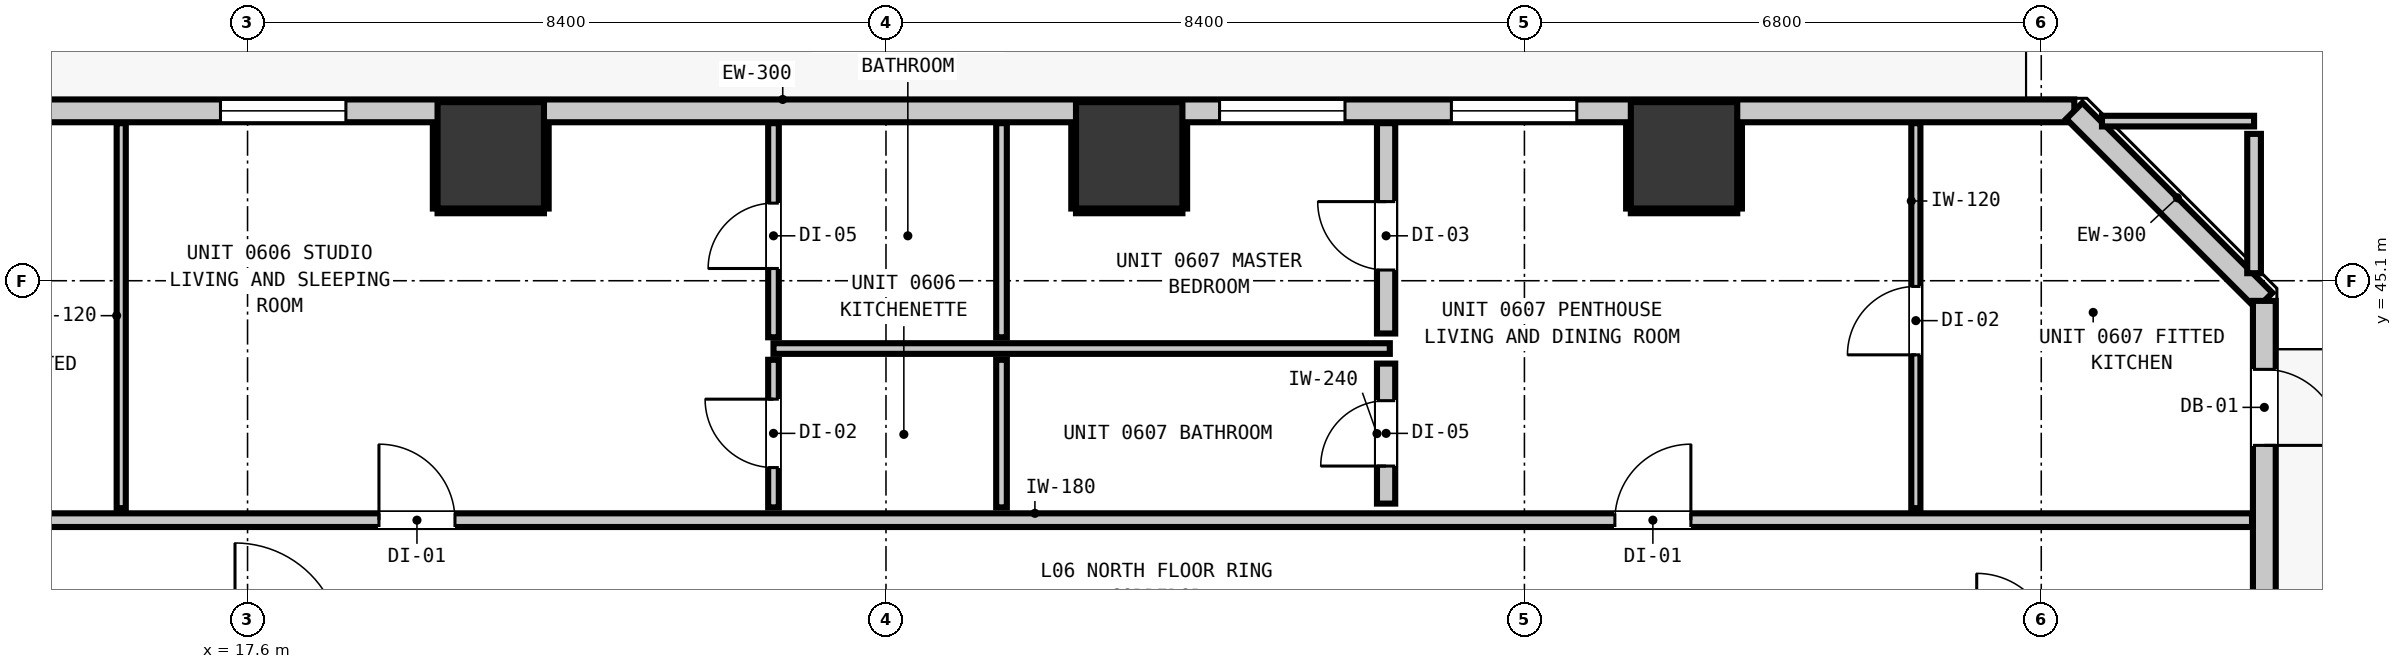
"""IFC4 building model, lengths in metres.
Left out: names, types, materials, properties, quantities, classifications, styles, units other than length and angle.
Written with IfcOpenShell. Run it as: python <this file> out.ifc"""

import sys

from ifc_helpers import new_model, si_unit, direction, frame, frame_2d, origin, origin_2d, place, context, subcontext, project, spatial, rectangle, extrude, element, fill, save


model = new_model("IFC4")
c1 = context("Model", 3, precision=1e-05, world=origin(), true_north=direction((0.0, 1.0)))
c2 = subcontext(c1, "Body", "Model", "MODEL_VIEW")
j1 = project(units=[si_unit("LENGTHUNIT", "METRE"), si_unit("PLANEANGLEUNIT", "RADIAN")], contexts=[c1])
p1 = place(None, origin())
s1 = spatial("IfcSite", under=j1, at=p1, CompositionType="ELEMENT")
p2 = place(p1, origin())
s2 = spatial("IfcBuilding", under=s1, at=p2, CompositionType="ELEMENT")
p3 = place(p2, frame((0.0, 0.0, 25.32)))
s3 = spatial("IfcBuildingStorey", under=s2, at=p3, CompositionType="ELEMENT", Elevation=25.32)
for number, where, z_axis, x_axis in (
    (1, (20.8, 46.75, 0.0), (0.0, 0.0, 1.0), (1.0, 0.0, 0.0)),
    (2, (29.2, 46.75, 0.0), (0.0, 0.0, 1.0), (1.0, 0.0, 0.0)),
    (3, (36.5, 46.75, 0.0), (0.0, 0.0, 1.0), (1.0, 0.0, 0.0)),
):
    element("IfcColumn", number, at=place(p3, frame(where, z_axis=z_axis, x_axis=x_axis)), inside=s3, PredefinedType="COLUMN", context=c2, shape_type="SweptSolid", body=[
        extrude(rectangle(XDim=1.4, YDim=1.4, at=origin_2d()), origin(), (0.0, 0.0, 1.0), 3.32),
    ])
p4 = place(p3, frame((4.165, 47.335, 0.0), z_axis=(0.0, 0.0, 1.0), x_axis=(1.0, 0.0, 0.0)))
e4 = element("IfcWall", 4, at=p4, inside=s3, PredefinedType="STANDARD", context=c2, shape_type="SweptSolid", body=[
    extrude(rectangle(XDim=37.47, YDim=0.3, at=frame_2d((18.735, 0.0))), origin(), (0.0, 0.0, 1.0), 3.06),
])
p5 = place(p4, frame((0.901, 0.0, 0.0)))
e5 = element("IfcOpeningElement", 5, at=p5, cuts=e4, PredefinedType="OPENING", context=c2, shape_type="SweptSolid", body=[
    extrude(rectangle(XDim=1.0, YDim=2.15, at=frame_2d((0.5, 1.075))), frame((0.0, 0.16, 0.0), z_axis=(0.0, -1.0, 0.0), x_axis=(1.0, 0.0, 0.0)), (0.0, 0.0, 1.0), 0.32),
])
p6 = place(p4, frame((4.243, 0.0, 0.85)))
e6 = element("IfcOpeningElement", 6, at=p6, cuts=e4, PredefinedType="OPENING", context=c2, shape_type="SweptSolid", body=[
    extrude(rectangle(XDim=1.65, YDim=1.75, at=frame_2d((0.825, 0.875))), frame((0.0, 0.16, 0.0), z_axis=(0.0, -1.0, 0.0), x_axis=(1.0, 0.0, 0.0)), (0.0, 0.0, 1.0), 0.32),
])
p7 = place(p4, frame((13.079, 0.0, 0.85)))
e7 = element("IfcOpeningElement", 7, at=p7, cuts=e4, PredefinedType="OPENING", context=c2, shape_type="SweptSolid", body=[
    extrude(rectangle(XDim=1.65, YDim=1.75, at=frame_2d((0.825, 0.875))), frame((0.0, 0.16, 0.0), z_axis=(0.0, -1.0, 0.0), x_axis=(1.0, 0.0, 0.0)), (0.0, 0.0, 1.0), 0.32),
])
p8 = place(p4, frame((29.274, 0.0, 0.85)))
e8 = element("IfcOpeningElement", 8, at=p8, cuts=e4, PredefinedType="OPENING", context=c2, shape_type="SweptSolid", body=[
    extrude(rectangle(XDim=1.65, YDim=1.75, at=frame_2d((0.825, 0.875))), frame((0.0, 0.16, 0.0), z_axis=(0.0, -1.0, 0.0), x_axis=(1.0, 0.0, 0.0)), (0.0, 0.0, 1.0), 0.32),
])
p9 = place(p4, frame((26.224, 0.0, 0.85)))
e9 = element("IfcOpeningElement", 9, at=p9, cuts=e4, PredefinedType="OPENING", context=c2, shape_type="SweptSolid", body=[
    extrude(rectangle(XDim=1.65, YDim=1.75, at=frame_2d((0.825, 0.875))), frame((0.0, 0.16, 0.0), z_axis=(0.0, -1.0, 0.0), x_axis=(1.0, 0.0, 0.0)), (0.0, 0.0, 1.0), 0.32),
])
p10 = place(p3, frame((41.635, 47.335, 0.0), z_axis=(0.0, 0.0, 1.0), x_axis=(0.707106781187, -0.707106781187, 0.0)))
e10 = element("IfcWall", 10, at=p10, inside=s3, PredefinedType="STANDARD", context=c2, shape_type="SweptSolid", body=[
    extrude(rectangle(XDim=3.536, YDim=0.3, at=frame_2d((1.768, 0.0))), origin(), (0.0, 0.0, 1.0), 3.06),
])
p11 = place(p3, frame((44.135, 44.835, 0.0), z_axis=(0.0, 0.0, 1.0), x_axis=(0.0, -1.0, 0.0)))
e11 = element("IfcWall", 11, at=p11, inside=s3, PredefinedType="STANDARD", context=c2, shape_type="SweptSolid", body=[
    extrude(rectangle(XDim=34.67, YDim=0.3, at=frame_2d((17.335, 0.0))), origin(), (0.0, 0.0, 1.0), 3.06),
])
p12 = place(p11, frame((0.901, 0.0, 0.0)))
e12 = element("IfcOpeningElement", 12, at=p12, cuts=e11, PredefinedType="OPENING", context=c2, shape_type="SweptSolid", body=[
    extrude(rectangle(XDim=1.0, YDim=2.15, at=frame_2d((0.5, 1.075))), frame((0.0, 0.16, 0.0), z_axis=(0.0, -1.0, 0.0), x_axis=(1.0, 0.0, 0.0)), (0.0, 0.0, 1.0), 0.32),
])
p13 = place(p11, frame((19.91, 0.0, 0.85)))
e13 = element("IfcOpeningElement", 13, at=p13, cuts=e11, PredefinedType="OPENING", context=c2, shape_type="SweptSolid", body=[
    extrude(rectangle(XDim=1.65, YDim=1.75, at=frame_2d((0.825, 0.875))), frame((0.0, 0.16, 0.0), z_axis=(0.0, -1.0, 0.0), x_axis=(1.0, 0.0, 0.0)), (0.0, 0.0, 1.0), 0.32),
])
p14 = place(p11, frame((7.126, 0.0, 0.85)))
e14 = element("IfcOpeningElement", 14, at=p14, cuts=e11, PredefinedType="OPENING", context=c2, shape_type="SweptSolid", body=[
    extrude(rectangle(XDim=1.65, YDim=1.75, at=frame_2d((0.825, 0.875))), frame((0.0, 0.16, 0.0), z_axis=(0.0, -1.0, 0.0), x_axis=(1.0, 0.0, 0.0)), (0.0, 0.0, 1.0), 0.32),
])
p15 = place(p3, frame((12.989, 41.95, 0.0), z_axis=(0.0, 0.0, 1.0), x_axis=(1.0, 0.0, 0.0)))
e15 = element("IfcWall", 15, at=p15, inside=s3, PredefinedType="PARTITIONING", context=c2, shape_type="SweptSolid", body=[
    extrude(rectangle(XDim=30.984, YDim=0.18, at=frame_2d((15.492, 0.0))), origin(), (0.0, 0.0, 1.0), 3.06),
])
p16 = place(p15, frame((6.34, 0.0, 0.0)))
e16 = element("IfcOpeningElement", 16, at=p16, cuts=e15, PredefinedType="OPENING", context=c2, shape_type="SweptSolid", body=[
    extrude(rectangle(XDim=1.0, YDim=2.15, at=frame_2d((0.5, 1.075))), frame((0.0, 0.1, 0.0), z_axis=(0.0, -1.0, 0.0), x_axis=(1.0, 0.0, 0.0)), (0.0, 0.0, 1.0), 0.2),
])
p17 = place(p15, frame((22.601, 0.0, 0.0)))
e17 = element("IfcOpeningElement", 17, at=p17, cuts=e15, PredefinedType="OPENING", context=c2, shape_type="SweptSolid", body=[
    extrude(rectangle(XDim=1.0, YDim=2.15, at=frame_2d((0.5, 1.075))), frame((0.0, 0.1, 0.0), z_axis=(0.0, -1.0, 0.0), x_axis=(1.0, 0.0, 0.0)), (0.0, 0.0, 1.0), 0.2),
])
p18 = place(p3, frame((24.52, 44.208, 0.0), z_axis=(0.0, 0.0, 1.0), x_axis=(1.0, 0.0, 0.0)))
e18 = element("IfcWall", 18, at=p18, inside=s3, PredefinedType="PARTITIONING", context=c2, shape_type="SweptSolid", body=[
    extrude(rectangle(XDim=8.109, YDim=0.14, at=frame_2d((4.054, 0.0))), origin(), (0.0, 0.0, 1.0), 3.06),
])
p19 = place(p3, frame((41.999, 47.2, 0.0), z_axis=(0.0, 0.0, 1.0), x_axis=(1.0, 0.0, 0.0)))
e19 = element("IfcWall", 19, at=p19, inside=s3, PredefinedType="PARTITIONING", context=c2, shape_type="SweptSolid", body=[
    extrude(rectangle(XDim=2.001, YDim=0.14, at=frame_2d((1.0, 0.0))), origin(), (0.0, 0.0, 1.0), 3.06),
])
p20 = place(p3, frame((32.58, 42.168, 0.0), z_axis=(0.0, 0.0, 1.0), x_axis=(0.0, 1.0, 0.0)))
e20 = element("IfcWall", 20, at=p20, inside=s3, PredefinedType="PARTITIONING", context=c2, shape_type="SweptSolid", body=[
    extrude(rectangle(XDim=1.842, YDim=0.24, at=frame_2d((0.921, 0.0))), origin(), (0.0, 0.0, 1.0), 3.06),
])
p21 = place(p20, frame((0.494, 0.0, 0.0)))
e21 = element("IfcOpeningElement", 21, at=p21, cuts=e20, PredefinedType="OPENING", context=c2, shape_type="SweptSolid", body=[
    extrude(rectangle(XDim=0.86, YDim=2.02, at=frame_2d((0.43, 1.01))), frame((0.0, 0.13, 0.0), z_axis=(0.0, -1.0, 0.0), x_axis=(1.0, 0.0, 0.0)), (0.0, 0.0, 1.0), 0.26),
])
p22 = place(p3, frame((32.58, 44.406, 0.0), z_axis=(0.0, 0.0, 1.0), x_axis=(0.0, 1.0, 0.0)))
e22 = element("IfcWall", 22, at=p22, inside=s3, PredefinedType="PARTITIONING", context=c2, shape_type="SweptSolid", body=[
    extrude(rectangle(XDim=2.767, YDim=0.24, at=frame_2d((1.384, 0.0))), origin(), (0.0, 0.0, 1.0), 3.06),
])
p23 = place(p22, frame((0.835, 0.0, 0.0)))
e23 = element("IfcOpeningElement", 23, at=p23, cuts=e22, PredefinedType="OPENING", context=c2, shape_type="SweptSolid", body=[
    extrude(rectangle(XDim=0.9, YDim=2.1, at=frame_2d((0.45, 1.05))), frame((0.0, 0.13, 0.0), z_axis=(0.0, -1.0, 0.0), x_axis=(1.0, 0.0, 0.0)), (0.0, 0.0, 1.0), 0.26),
])
p24 = place(p3, frame((44.0, 45.199, 0.0), z_axis=(0.0, 0.0, 1.0), x_axis=(0.0, 1.0, 0.0)))
e24 = element("IfcWall", 24, at=p24, inside=s3, PredefinedType="PARTITIONING", context=c2, shape_type="SweptSolid", body=[
    extrude(rectangle(XDim=1.833, YDim=0.18, at=frame_2d((0.917, 0.0))), origin(), (0.0, 0.0, 1.0), 3.06),
])
p25 = place(p3, frame((24.52, 42.118, 0.0), z_axis=(0.0, 0.0, 1.0), x_axis=(0.0, 1.0, 0.0)))
e25 = element("IfcWall", 25, at=p25, inside=s3, PredefinedType="PARTITIONING", context=c2, shape_type="SweptSolid", body=[
    extrude(rectangle(XDim=1.942, YDim=0.14, at=frame_2d((0.971, 0.0))), origin(), (0.0, 0.0, 1.0), 3.06),
])
p26 = place(p25, frame((0.524, 0.0, 0.0)))
e26 = element("IfcOpeningElement", 26, at=p26, cuts=e25, PredefinedType="OPENING", context=c2, shape_type="SweptSolid", body=[
    extrude(rectangle(XDim=0.9, YDim=2.1, at=frame_2d((0.45, 1.05))), frame((0.0, 0.08, 0.0), z_axis=(0.0, -1.0, 0.0), x_axis=(1.0, 0.0, 0.0)), (0.0, 0.0, 1.0), 0.16),
])
p27 = place(p3, frame((24.52, 44.356, 0.0), z_axis=(0.0, 0.0, 1.0), x_axis=(0.0, 1.0, 0.0)))
e27 = element("IfcWall", 27, at=p27, inside=s3, PredefinedType="PARTITIONING", context=c2, shape_type="SweptSolid", body=[
    extrude(rectangle(XDim=2.817, YDim=0.14, at=frame_2d((1.409, 0.0))), origin(), (0.0, 0.0, 1.0), 3.06),
])
p28 = place(p27, frame((0.905, 0.0, 0.0)))
e28 = element("IfcOpeningElement", 28, at=p28, cuts=e27, PredefinedType="OPENING", context=c2, shape_type="SweptSolid", body=[
    extrude(rectangle(XDim=0.86, YDim=2.02, at=frame_2d((0.43, 1.01))), frame((0.0, 0.08, 0.0), z_axis=(0.0, -1.0, 0.0), x_axis=(1.0, 0.0, 0.0)), (0.0, 0.0, 1.0), 0.16),
])
p29 = place(p3, frame((27.52, 42.118, 0.0), z_axis=(0.0, 0.0, 1.0), x_axis=(0.0, 1.0, 0.0)))
e29 = element("IfcWall", 29, at=p29, inside=s3, PredefinedType="PARTITIONING", context=c2, shape_type="SweptSolid", body=[
    extrude(rectangle(XDim=1.942, YDim=0.14, at=frame_2d((0.971, 0.0))), origin(), (0.0, 0.0, 1.0), 3.06),
])
p30 = place(p3, frame((27.52, 44.356, 0.0), z_axis=(0.0, 0.0, 1.0), x_axis=(0.0, 1.0, 0.0)))
e30 = element("IfcWall", 30, at=p30, inside=s3, PredefinedType="PARTITIONING", context=c2, shape_type="SweptSolid", body=[
    extrude(rectangle(XDim=2.817, YDim=0.14, at=frame_2d((1.409, 0.0))), origin(), (0.0, 0.0, 1.0), 3.06),
])
p31 = place(p3, frame((15.938, 42.108, 0.0), z_axis=(0.0, 0.0, 1.0), x_axis=(0.0, 1.0, 0.0)))
e31 = element("IfcWall", 31, at=p31, inside=s3, PredefinedType="PARTITIONING", context=c2, shape_type="SweptSolid", body=[
    extrude(rectangle(XDim=5.065, YDim=0.12, at=frame_2d((2.533, 0.0))), origin(), (0.0, 0.0, 1.0), 3.06),
])
p32 = place(p3, frame((39.55, 42.108, 0.0), z_axis=(0.0, 0.0, 1.0), x_axis=(0.0, 1.0, 0.0)))
e32 = element("IfcWall", 32, at=p32, inside=s3, PredefinedType="PARTITIONING", context=c2, shape_type="SweptSolid", body=[
    extrude(rectangle(XDim=5.065, YDim=0.12, at=frame_2d((2.533, 0.0))), origin(), (0.0, 0.0, 1.0), 3.06),
])
p33 = place(p32, frame((2.017, 0.0, 0.0)))
e33 = element("IfcOpeningElement", 33, at=p33, cuts=e32, PredefinedType="OPENING", context=c2, shape_type="SweptSolid", body=[
    extrude(rectangle(XDim=0.9, YDim=2.1, at=frame_2d((0.45, 1.05))), frame((0.0, 0.07, 0.0), z_axis=(0.0, -1.0, 0.0), x_axis=(1.0, 0.0, 0.0)), (0.0, 0.0, 1.0), 0.14),
])
p34 = place(p3, frame((20.1, 46.018, 0.0), z_axis=(0.0, 0.0, 1.0), x_axis=(1.0, 0.0, 0.0)))
e34 = element("IfcWall", 34, at=p34, inside=s3, PredefinedType="PARTITIONING", context=c2, shape_type="SweptSolid", body=[
    extrude(rectangle(XDim=1.4, YDim=0.06, at=frame_2d((0.7, 0.0))), origin(), (0.0, 0.0, 1.0), 1.45),
])
for number, where, z_axis, x_axis in (
    (35, (20.068, 46.05, 0.0), (0.0, 0.0, 1.0), (0.0, 1.0, 0.0)),
    (36, (21.532, 46.05, 0.0), (0.0, 0.0, 1.0), (0.0, 1.0, 0.0)),
):
    element("IfcWall", number, at=place(p3, frame(where, z_axis=z_axis, x_axis=x_axis)), inside=s3, PredefinedType="PARTITIONING", context=c2, shape_type="SweptSolid", body=[
        extrude(rectangle(XDim=1.12, YDim=0.06, at=frame_2d((0.56, 0.0))), origin(), (0.0, 0.0, 1.0), 1.45),
    ])
p35 = place(p3, frame((28.5, 46.018, 0.0), z_axis=(0.0, 0.0, 1.0), x_axis=(1.0, 0.0, 0.0)))
e37 = element("IfcWall", 37, at=p35, inside=s3, PredefinedType="PARTITIONING", context=c2, shape_type="SweptSolid", body=[
    extrude(rectangle(XDim=1.4, YDim=0.06, at=frame_2d((0.7, 0.0))), origin(), (0.0, 0.0, 1.0), 1.45),
])
for number, where, z_axis, x_axis in (
    (38, (28.468, 46.05, 0.0), (0.0, 0.0, 1.0), (0.0, 1.0, 0.0)),
    (39, (29.932, 46.05, 0.0), (0.0, 0.0, 1.0), (0.0, 1.0, 0.0)),
):
    element("IfcWall", number, at=place(p3, frame(where, z_axis=z_axis, x_axis=x_axis)), inside=s3, PredefinedType="PARTITIONING", context=c2, shape_type="SweptSolid", body=[
        extrude(rectangle(XDim=1.12, YDim=0.06, at=frame_2d((0.56, 0.0))), origin(), (0.0, 0.0, 1.0), 1.45),
    ])
p36 = place(p3, frame((35.8, 46.018, 0.0), z_axis=(0.0, 0.0, 1.0), x_axis=(1.0, 0.0, 0.0)))
e40 = element("IfcWall", 40, at=p36, inside=s3, PredefinedType="PARTITIONING", context=c2, shape_type="SweptSolid", body=[
    extrude(rectangle(XDim=1.4, YDim=0.06, at=frame_2d((0.7, 0.0))), origin(), (0.0, 0.0, 1.0), 1.45),
])
for number, where, z_axis, x_axis in (
    (41, (35.768, 46.05, 0.0), (0.0, 0.0, 1.0), (0.0, 1.0, 0.0)),
    (42, (37.232, 46.05, 0.0), (0.0, 0.0, 1.0), (0.0, 1.0, 0.0)),
):
    element("IfcWall", number, at=place(p3, frame(where, z_axis=z_axis, x_axis=x_axis)), inside=s3, PredefinedType="PARTITIONING", context=c2, shape_type="SweptSolid", body=[
        extrude(rectangle(XDim=1.12, YDim=0.06, at=frame_2d((0.56, 0.0))), origin(), (0.0, 0.0, 1.0), 1.45),
    ])
p37 = place(p12, origin())
e43 = element("IfcDoor", 43, at=p37, inside=s3, OperationType="SINGLE_SWING_RIGHT", PredefinedType="DOOR", context=c2, shape_type="SweptSolid", body=[
    extrude(rectangle(XDim=1.0, YDim=2.15, at=frame_2d((0.5, 1.075))), frame((0.0, 0.025, 0.0), z_axis=(0.0, -1.0, 0.0), x_axis=(1.0, 0.0, 0.0)), (0.0, 0.0, 1.0), 0.05),
])
fill(e12, e43)
p38 = place(p7, origin())
e44 = element("IfcWindow", 44, at=p38, inside=s3, PartitioningType="SINGLE_PANEL", PredefinedType="WINDOW", context=c2, shape_type="SweptSolid", body=[
    extrude(rectangle(XDim=1.65, YDim=1.75, at=frame_2d((0.825, 0.875))), frame((0.0, 0.03, 0.0), z_axis=(0.0, -1.0, 0.0), x_axis=(1.0, 0.0, 0.0)), (0.0, 0.0, 1.0), 0.06),
])
fill(e7, e44)
p39 = place(p8, origin())
e45 = element("IfcWindow", 45, at=p39, inside=s3, PartitioningType="SINGLE_PANEL", PredefinedType="WINDOW", context=c2, shape_type="SweptSolid", body=[
    extrude(rectangle(XDim=1.65, YDim=1.75, at=frame_2d((0.825, 0.875))), frame((0.0, 0.03, 0.0), z_axis=(0.0, -1.0, 0.0), x_axis=(1.0, 0.0, 0.0)), (0.0, 0.0, 1.0), 0.06),
])
fill(e8, e45)
p40 = place(p9, origin())
e46 = element("IfcWindow", 46, at=p40, inside=s3, PartitioningType="SINGLE_PANEL", PredefinedType="WINDOW", context=c2, shape_type="SweptSolid", body=[
    extrude(rectangle(XDim=1.65, YDim=1.75, at=frame_2d((0.825, 0.875))), frame((0.0, 0.03, 0.0), z_axis=(0.0, -1.0, 0.0), x_axis=(1.0, 0.0, 0.0)), (0.0, 0.0, 1.0), 0.06),
])
fill(e9, e46)
p41 = place(p16, origin())
e47 = element("IfcDoor", 47, at=p41, inside=s3, OperationType="SINGLE_SWING_LEFT", PredefinedType="DOOR", context=c2, shape_type="SweptSolid", body=[
    extrude(rectangle(XDim=1.0, YDim=2.15, at=frame_2d((0.5, 1.075))), frame((0.0, 0.025, 0.0), z_axis=(0.0, -1.0, 0.0), x_axis=(1.0, 0.0, 0.0)), (0.0, 0.0, 1.0), 0.05),
])
fill(e16, e47)
p42 = place(p26, origin())
e48 = element("IfcDoor", 48, at=p42, inside=s3, OperationType="SINGLE_SWING_RIGHT", PredefinedType="DOOR", context=c2, shape_type="SweptSolid", body=[
    extrude(rectangle(XDim=0.9, YDim=2.1, at=frame_2d((0.45, 1.05))), frame((0.0, 0.025, 0.0), z_axis=(0.0, -1.0, 0.0), x_axis=(1.0, 0.0, 0.0)), (0.0, 0.0, 1.0), 0.05),
])
fill(e26, e48)
p43 = place(p28, origin())
e49 = element("IfcDoor", 49, at=p43, inside=s3, OperationType="SINGLE_SWING_LEFT", PredefinedType="DOOR", context=c2, shape_type="SweptSolid", body=[
    extrude(rectangle(XDim=0.86, YDim=2.02, at=frame_2d((0.43, 1.01))), frame((0.0, 0.025, 0.0), z_axis=(0.0, -1.0, 0.0), x_axis=(1.0, 0.0, 0.0)), (0.0, 0.0, 1.0), 0.05),
])
fill(e28, e49)
p44 = place(p17, origin())
e50 = element("IfcDoor", 50, at=p44, inside=s3, OperationType="SINGLE_SWING_RIGHT", PredefinedType="DOOR", context=c2, shape_type="SweptSolid", body=[
    extrude(rectangle(XDim=1.0, YDim=2.15, at=frame_2d((0.5, 1.075))), frame((0.0, 0.025, 0.0), z_axis=(0.0, -1.0, 0.0), x_axis=(1.0, 0.0, 0.0)), (0.0, 0.0, 1.0), 0.05),
])
fill(e17, e50)
p45 = place(p21, origin())
e51 = element("IfcDoor", 51, at=p45, inside=s3, OperationType="SINGLE_SWING_LEFT", PredefinedType="DOOR", context=c2, shape_type="SweptSolid", body=[
    extrude(rectangle(XDim=0.86, YDim=2.02, at=frame_2d((0.43, 1.01))), frame((0.0, 0.025, 0.0), z_axis=(0.0, -1.0, 0.0), x_axis=(1.0, 0.0, 0.0)), (0.0, 0.0, 1.0), 0.05),
])
fill(e21, e51)
p46 = place(p23, origin())
e52 = element("IfcDoor", 52, at=p46, inside=s3, OperationType="SINGLE_SWING_RIGHT", PredefinedType="DOOR", context=c2, shape_type="SweptSolid", body=[
    extrude(rectangle(XDim=0.9, YDim=2.1, at=frame_2d((0.45, 1.05))), frame((0.0, 0.025, 0.0), z_axis=(0.0, -1.0, 0.0), x_axis=(1.0, 0.0, 0.0)), (0.0, 0.0, 1.0), 0.05),
])
fill(e23, e52)
p47 = place(p33, origin())
e53 = element("IfcDoor", 53, at=p47, inside=s3, OperationType="SINGLE_SWING_LEFT", PredefinedType="DOOR", context=c2, shape_type="SweptSolid", body=[
    extrude(rectangle(XDim=0.9, YDim=2.1, at=frame_2d((0.45, 1.05))), frame((0.0, 0.025, 0.0), z_axis=(0.0, -1.0, 0.0), x_axis=(1.0, 0.0, 0.0)), (0.0, 0.0, 1.0), 0.05),
])
fill(e33, e53)
save(model, sys.argv[1])
